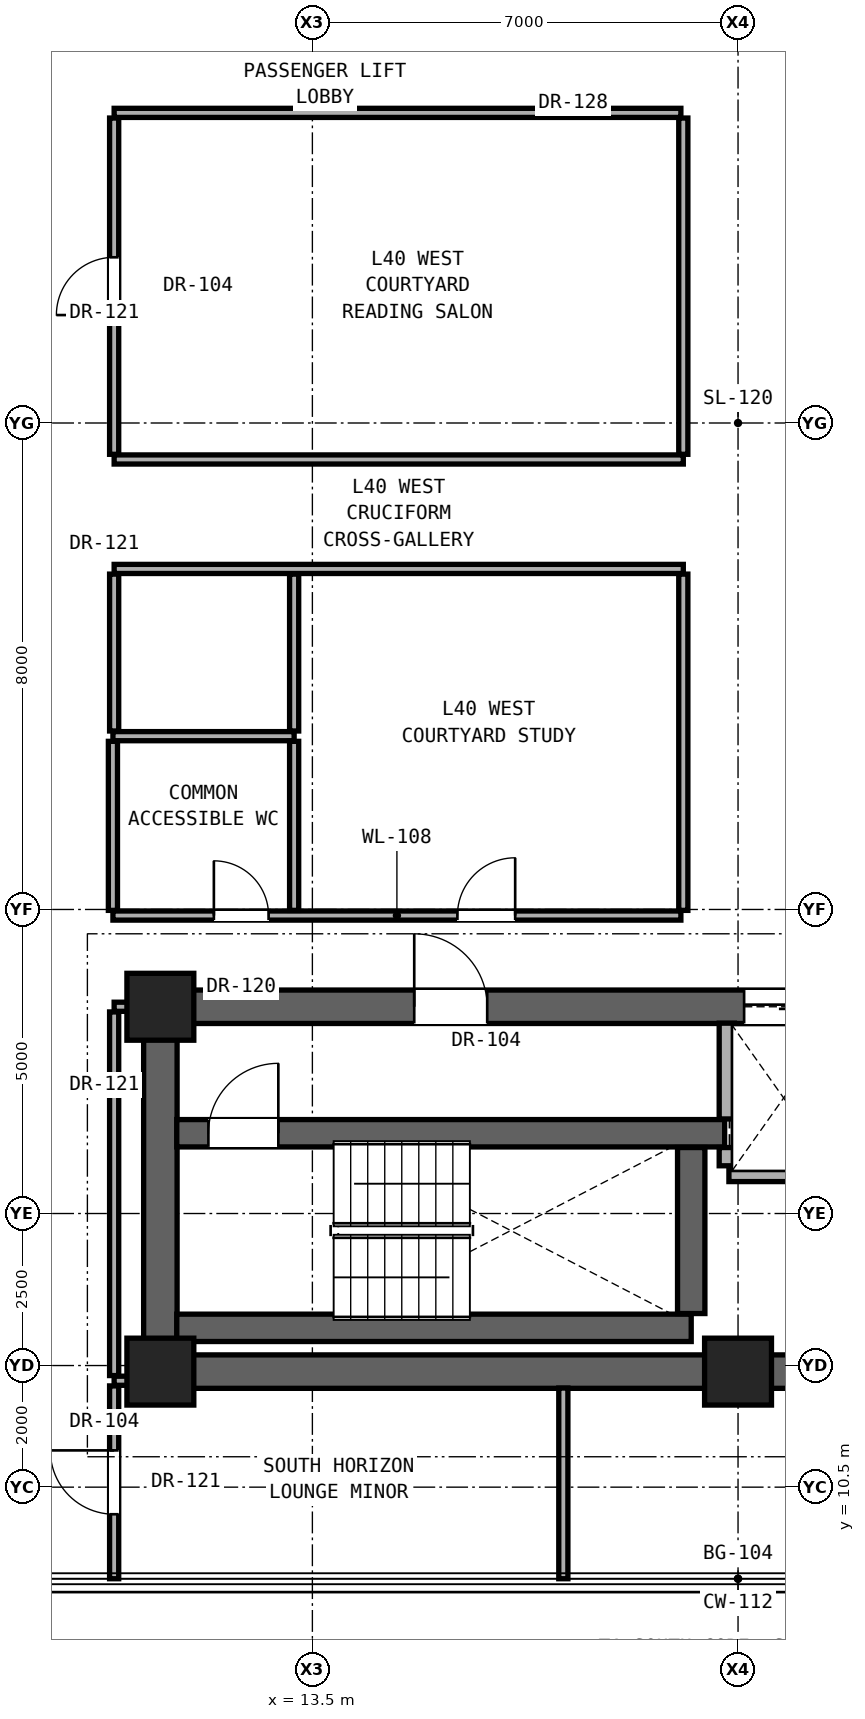
"""IFC4 building model, lengths in metres.
Left out: names, types, materials, properties, quantities, classifications, styles, units other than length and angle.
Written with IfcOpenShell. Run it as: python <this file> out.ifc"""

import sys

from ifc_helpers import new_model, si_unit, direction, frame, frame_2d, origin, origin_2d, place, context, subcontext, project, spatial, rectangle, extrude, element, fill, save


model = new_model("IFC4")
c1 = context("Model", 3, precision=1e-05, world=origin(), true_north=direction((0.0, 1.0)))
c2 = subcontext(c1, "Body", "Model", "MODEL_VIEW")
j1 = project(units=[si_unit("LENGTHUNIT", "METRE"), si_unit("PLANEANGLEUNIT", "RADIAN")], contexts=[c1])
p1 = place(None, origin())
s1 = spatial("IfcSite", under=j1, at=p1, CompositionType="ELEMENT")
p2 = place(p1, origin())
s2 = spatial("IfcBuilding", under=s1, at=p2, CompositionType="ELEMENT")
p3 = place(p2, frame((0.0, 0.0, 141.2)))
s3 = spatial("IfcBuildingStorey", under=s2, at=p3, CompositionType="ELEMENT", Elevation=141.2)
for number, where, z_axis, x_axis in (
    (1, (11.0, 12.4, 0.0), (0.0, 0.0, 1.0), (1.0, 0.0, 0.0)),
    (2, (20.5, 12.4, 0.0), (0.0, 0.0, 1.0), (1.0, 0.0, 0.0)),
    (3, (11.0, 18.4, 0.0), (0.0, 0.0, 1.0), (1.0, 0.0, 0.0)),
):
    element("IfcColumn", number, at=place(p3, frame(where, z_axis=z_axis, x_axis=x_axis)), inside=s3, PredefinedType="COLUMN", context=c2, shape_type="SweptSolid", body=[
        extrude(rectangle(XDim=1.1, YDim=1.1, at=origin_2d()), origin(), (0.0, 0.0, 1.0), 3.3),
    ])
p4 = place(p3, frame((11.0, 12.4, 0.0), z_axis=(0.0, 0.0, 1.0), x_axis=(1.0, 0.0, 0.0)))
e4 = element("IfcWall", 4, at=p4, inside=s3, PredefinedType="SHEAR", context=c2, shape_type="SweptSolid", body=[
    extrude(rectangle(XDim=19.0, YDim=0.55, at=frame_2d((9.5, 0.0))), origin(), (0.0, 0.0, 1.0), 3.08),
])
p5 = place(p3, frame((11.0, 12.4, 0.0), z_axis=(0.0, 0.0, 1.0), x_axis=(0.0, 1.0, 0.0)))
e5 = element("IfcWall", 5, at=p5, inside=s3, PredefinedType="SHEAR", context=c2, shape_type="SweptSolid", body=[
    extrude(rectangle(XDim=6.0, YDim=0.55, at=frame_2d((3.0, 0.0))), origin(), (0.0, 0.0, 1.0), 3.08),
])
p6 = place(p3, frame((11.0, 18.4, 0.0), z_axis=(0.0, 0.0, 1.0), x_axis=(1.0, 0.0, 0.0)))
e6 = element("IfcWall", 6, at=p6, inside=s3, PredefinedType="SHEAR", context=c2, shape_type="SweptSolid", body=[
    extrude(rectangle(XDim=19.0, YDim=0.55, at=frame_2d((9.5, 0.0))), origin(), (0.0, 0.0, 1.0), 3.08),
])
p7 = place(p6, frame((4.175, 0.0, 0.0)))
e7 = element("IfcOpeningElement", 7, at=p7, cuts=e6, PredefinedType="OPENING", context=c2, shape_type="SweptSolid", body=[
    extrude(rectangle(XDim=1.2, YDim=2.25, at=frame_2d((0.6, 1.125))), frame((0.0, 0.285, 0.0), z_axis=(0.0, -1.0, 0.0), x_axis=(1.0, 0.0, 0.0)), (0.0, 0.0, 1.0), 0.57),
])
p8 = place(p6, frame((9.6, 0.0, 0.0)))
e8 = element("IfcOpeningElement", 8, at=p8, cuts=e6, PredefinedType="OPENING", context=c2, shape_type="SweptSolid", body=[
    extrude(rectangle(XDim=1.3, YDim=2.3, at=frame_2d((0.65, 1.15))), frame((0.0, 0.285, 0.0), z_axis=(0.0, -1.0, 0.0), x_axis=(1.0, 0.0, 0.0)), (0.0, 0.0, 1.0), 0.57),
])
p9 = place(p6, frame((11.9, 0.0, 0.0)))
e9 = element("IfcOpeningElement", 9, at=p9, cuts=e6, PredefinedType="OPENING", context=c2, shape_type="SweptSolid", body=[
    extrude(rectangle(XDim=1.3, YDim=2.3, at=frame_2d((0.65, 1.15))), frame((0.0, 0.285, 0.0), z_axis=(0.0, -1.0, 0.0), x_axis=(1.0, 0.0, 0.0)), (0.0, 0.0, 1.0), 0.57),
])
p10 = place(p6, frame((14.3, 0.0, 0.0)))
e10 = element("IfcOpeningElement", 10, at=p10, cuts=e6, PredefinedType="OPENING", context=c2, shape_type="SweptSolid", body=[
    extrude(rectangle(XDim=1.3, YDim=2.3, at=frame_2d((0.65, 1.15))), frame((0.0, 0.285, 0.0), z_axis=(0.0, -1.0, 0.0), x_axis=(1.0, 0.0, 0.0)), (0.0, 0.0, 1.0), 0.57),
])
p11 = place(p6, frame((16.6, 0.0, 0.0)))
e11 = element("IfcOpeningElement", 11, at=p11, cuts=e6, PredefinedType="OPENING", context=c2, shape_type="SweptSolid", body=[
    extrude(rectangle(XDim=1.3, YDim=2.3, at=frame_2d((0.65, 1.15))), frame((0.0, 0.285, 0.0), z_axis=(0.0, -1.0, 0.0), x_axis=(1.0, 0.0, 0.0)), (0.0, 0.0, 1.0), 0.57),
])
p12 = place(p3, frame((10.24, 12.25, 0.0), z_axis=(0.0, 0.0, 1.0), x_axis=(1.0, 0.0, 0.0)))
e12 = element("IfcWall", 12, at=p12, inside=s3, PredefinedType="PARTITIONING", context=c2, shape_type="SweptSolid", body=[
    extrude(rectangle(XDim=0.49, YDim=0.15, at=frame_2d((0.245, 0.0))), origin(), (0.0, 0.0, 1.0), 3.08),
])
p13 = place(p3, frame((11.27, 13.12, 0.0), z_axis=(0.0, 0.0, 1.0), x_axis=(1.0, 0.0, 0.0)))
e13 = element("IfcWall", 13, at=p13, inside=s3, PredefinedType="SHEAR", context=c2, shape_type="SweptSolid", body=[
    extrude(rectangle(XDim=8.46, YDim=0.45, at=frame_2d((4.23, 0.0))), origin(), (0.0, 0.0, 1.0), 3.08),
])
p14 = place(p3, frame((20.35, 15.65, 0.0), z_axis=(0.0, 0.0, 1.0), x_axis=(1.0, 0.0, 0.0)))
e14 = element("IfcWall", 14, at=p14, inside=s3, PredefinedType="SOLIDWALL", context=c2, shape_type="SweptSolid", body=[
    extrude(rectangle(XDim=4.15, YDim=0.25, at=frame_2d((2.075, 0.0))), origin(), (0.0, 0.0, 1.0), 3.08),
])
p15 = place(p3, frame((11.27, 16.32, 0.0), z_axis=(0.0, 0.0, 1.0), x_axis=(1.0, 0.0, 0.0)))
e15 = element("IfcWall", 15, at=p15, inside=s3, PredefinedType="SHEAR", context=c2, shape_type="SweptSolid", body=[
    extrude(rectangle(XDim=9.01, YDim=0.45, at=frame_2d((4.505, 0.0))), origin(), (0.0, 0.0, 1.0), 3.08),
])
p16 = place(p15, frame((0.52, 0.0, 0.0)))
e16 = element("IfcOpeningElement", 16, at=p16, cuts=e15, PredefinedType="OPENING", context=c2, shape_type="SweptSolid", body=[
    extrude(rectangle(XDim=1.15, YDim=2.2, at=frame_2d((0.575, 1.1))), frame((0.0, 0.235, 0.0), z_axis=(0.0, -1.0, 0.0), x_axis=(1.0, 0.0, 0.0)), (0.0, 0.0, 1.0), 0.47),
])
p17 = place(p3, frame((10.24, 18.4, 0.0), z_axis=(0.0, 0.0, 1.0), x_axis=(1.0, 0.0, 0.0)))
e17 = element("IfcWall", 17, at=p17, inside=s3, PredefinedType="PARTITIONING", context=c2, shape_type="SweptSolid", body=[
    extrude(rectangle(XDim=0.49, YDim=0.15, at=frame_2d((0.245, 0.0))), origin(), (0.0, 0.0, 1.0), 2.456),
])
p18 = place(p3, frame((10.22, 19.9, 0.0), z_axis=(0.0, 0.0, 1.0), x_axis=(1.0, 0.0, 0.0)))
e18 = element("IfcWall", 18, at=p18, inside=s3, PredefinedType="PARTITIONING", context=c2, shape_type="SweptSolid", body=[
    extrude(rectangle(XDim=9.34, YDim=0.15, at=frame_2d((4.67, 0.0))), origin(), (0.0, 0.0, 1.0), 2.216),
])
p19 = place(p18, frame((1.66, 0.0, 0.0)))
e19 = element("IfcOpeningElement", 19, at=p19, cuts=e18, PredefinedType="OPENING", context=c2, shape_type="SweptSolid", body=[
    extrude(rectangle(XDim=0.9, YDim=2.1, at=frame_2d((0.45, 1.05))), frame((0.0, 0.085, 0.0), z_axis=(0.0, -1.0, 0.0), x_axis=(1.0, 0.0, 0.0)), (0.0, 0.0, 1.0), 0.17),
])
p20 = place(p18, frame((5.665, 0.0, 0.0)))
e20 = element("IfcOpeningElement", 20, at=p20, cuts=e18, PredefinedType="OPENING", context=c2, shape_type="SweptSolid", body=[
    extrude(rectangle(XDim=0.95, YDim=2.15, at=frame_2d((0.475, 1.075))), frame((0.0, 0.085, 0.0), z_axis=(0.0, -1.0, 0.0), x_axis=(1.0, 0.0, 0.0)), (0.0, 0.0, 1.0), 0.17),
])
p21 = place(p3, frame((10.22, 22.85, 0.0), z_axis=(0.0, 0.0, 1.0), x_axis=(1.0, 0.0, 0.0)))
e21 = element("IfcWall", 21, at=p21, inside=s3, PredefinedType="PARTITIONING", context=c2, shape_type="SweptSolid", body=[
    extrude(rectangle(XDim=2.98, YDim=0.15, at=frame_2d((1.49, 0.0))), origin(), (0.0, 0.0, 1.0), 2.216),
])
for number, where, z_axis, x_axis in (
    (22, (10.24, 25.6, 0.0), (0.0, 0.0, 1.0), (1.0, 0.0, 0.0)),
    (23, (10.24, 27.4, 0.0), (0.0, 0.0, 1.0), (1.0, 0.0, 0.0)),
):
    element("IfcWall", number, at=place(p3, frame(where, z_axis=z_axis, x_axis=x_axis)), inside=s3, PredefinedType="PARTITIONING", context=c2, shape_type="SweptSolid", body=[
        extrude(rectangle(XDim=9.36, YDim=0.15, at=frame_2d((4.68, 0.0))), origin(), (0.0, 0.0, 1.0), 2.216),
    ])
p22 = place(p3, frame((10.24, 33.1, 0.0), z_axis=(0.0, 0.0, 1.0), x_axis=(1.0, 0.0, 0.0)))
e24 = element("IfcWall", 24, at=p22, inside=s3, PredefinedType="PARTITIONING", context=c2, shape_type="SweptSolid", body=[
    extrude(rectangle(XDim=9.32, YDim=0.15, at=frame_2d((4.66, 0.0))), origin(), (0.0, 0.0, 1.0), 2.216),
])
p23 = place(p3, frame((10.22, 19.985, 0.0), z_axis=(0.0, 0.0, 1.0), x_axis=(0.0, 1.0, 0.0)))
e25 = element("IfcWall", 25, at=p23, inside=s3, PredefinedType="PARTITIONING", context=c2, shape_type="SweptSolid", body=[
    extrude(rectangle(XDim=2.78, YDim=0.15, at=frame_2d((1.39, 0.0))), origin(), (0.0, 0.0, 1.0), 3.08),
])
p24 = place(p3, frame((10.24, 8.994, 0.0), z_axis=(0.0, 0.0, 1.0), x_axis=(0.0, 1.0, 0.0)))
e26 = element("IfcWall", 26, at=p24, inside=s3, PredefinedType="PARTITIONING", context=c2, shape_type="SweptSolid", body=[
    extrude(rectangle(XDim=3.171, YDim=0.15, at=frame_2d((1.585, 0.0))), origin(), (0.0, 0.0, 1.0), 3.08),
])
p25 = place(p24, frame((1.061, 0.0, 0.0)))
e27 = element("IfcOpeningElement", 27, at=p25, cuts=e26, PredefinedType="OPENING", context=c2, shape_type="SweptSolid", body=[
    extrude(rectangle(XDim=1.05, YDim=2.2, at=frame_2d((0.525, 1.1))), frame((0.0, 0.085, 0.0), z_axis=(0.0, -1.0, 0.0), x_axis=(1.0, 0.0, 0.0)), (0.0, 0.0, 1.0), 0.17),
])
p26 = place(p3, frame((10.24, 12.335, 0.0), z_axis=(0.0, 0.0, 1.0), x_axis=(0.0, 1.0, 0.0)))
e28 = element("IfcWall", 28, at=p26, inside=s3, PredefinedType="PARTITIONING", context=c2, shape_type="SweptSolid", body=[
    extrude(rectangle(XDim=5.98, YDim=0.15, at=frame_2d((2.99, 0.0))), origin(), (0.0, 0.0, 1.0), 2.456),
])
p27 = place(p3, frame((10.24, 22.935, 0.0), z_axis=(0.0, 0.0, 1.0), x_axis=(0.0, 1.0, 0.0)))
e29 = element("IfcWall", 29, at=p27, inside=s3, PredefinedType="PARTITIONING", context=c2, shape_type="SweptSolid", body=[
    extrude(rectangle(XDim=2.58, YDim=0.15, at=frame_2d((1.29, 0.0))), origin(), (0.0, 0.0, 1.0), 2.299),
])
p28 = place(p3, frame((10.24, 27.485, 0.0), z_axis=(0.0, 0.0, 1.0), x_axis=(0.0, 1.0, 0.0)))
e30 = element("IfcWall", 30, at=p28, inside=s3, PredefinedType="PARTITIONING", context=c2, shape_type="SweptSolid", body=[
    extrude(rectangle(XDim=5.53, YDim=0.15, at=frame_2d((2.765, 0.0))), origin(), (0.0, 0.0, 1.0), 2.299),
])
p29 = place(p28, frame((2.29, 0.0, 0.0)))
e31 = element("IfcOpeningElement", 31, at=p29, cuts=e30, PredefinedType="OPENING", context=c2, shape_type="SweptSolid", body=[
    extrude(rectangle(XDim=0.95, YDim=2.15, at=frame_2d((0.475, 1.075))), frame((0.0, 0.085, 0.0), z_axis=(0.0, -1.0, 0.0), x_axis=(1.0, 0.0, 0.0)), (0.0, 0.0, 1.0), 0.17),
])
p30 = place(p3, frame((13.2, 19.985, 0.0), z_axis=(0.0, 0.0, 1.0), x_axis=(0.0, 1.0, 0.0)))
e32 = element("IfcWall", 32, at=p30, inside=s3, PredefinedType="PARTITIONING", context=c2, shape_type="SweptSolid", body=[
    extrude(rectangle(XDim=2.78, YDim=0.15, at=frame_2d((1.39, 0.0))), origin(), (0.0, 0.0, 1.0), 3.08),
])
p31 = place(p3, frame((13.2, 22.935, 0.0), z_axis=(0.0, 0.0, 1.0), x_axis=(0.0, 1.0, 0.0)))
e33 = element("IfcWall", 33, at=p31, inside=s3, PredefinedType="PARTITIONING", context=c2, shape_type="SweptSolid", body=[
    extrude(rectangle(XDim=2.58, YDim=0.15, at=frame_2d((1.29, 0.0))), origin(), (0.0, 0.0, 1.0), 2.216),
])
p32 = place(p3, frame((17.627, 8.994, 0.0), z_axis=(0.0, 0.0, 1.0), x_axis=(0.0, 1.0, 0.0)))
e34 = element("IfcWall", 34, at=p32, inside=s3, PredefinedType="PARTITIONING", context=c2, shape_type="SweptSolid", body=[
    extrude(rectangle(XDim=3.136, YDim=0.15, at=frame_2d((1.568, 0.0))), origin(), (0.0, 0.0, 1.0), 3.08),
])
for number, where, z_axis, x_axis in (
    (35, (19.6, 19.985, 0.0), (0.0, 0.0, 1.0), (0.0, 1.0, 0.0)),
    (36, (19.6, 27.485, 0.0), (0.0, 0.0, 1.0), (0.0, 1.0, 0.0)),
):
    element("IfcWall", number, at=place(p3, frame(where, z_axis=z_axis, x_axis=x_axis)), inside=s3, PredefinedType="PARTITIONING", context=c2, shape_type="SweptSolid", body=[
        extrude(rectangle(XDim=5.53, YDim=0.15, at=frame_2d((2.765, 0.0))), origin(), (0.0, 0.0, 1.0), 2.216),
    ])
p33 = place(p3, frame((19.73, 13.355, 0.0), z_axis=(0.0, 0.0, 1.0), x_axis=(0.0, 1.0, 0.0)))
e37 = element("IfcWall", 37, at=p33, inside=s3, PredefinedType="SHEAR", context=c2, shape_type="SweptSolid", body=[
    extrude(rectangle(XDim=2.73, YDim=0.45, at=frame_2d((1.365, 0.0))), origin(), (0.0, 0.0, 1.0), 3.08),
])
p34 = place(p3, frame((20.315, 15.785, 0.0), z_axis=(0.0, 0.0, 1.0), x_axis=(0.0, 1.0, 0.0)))
e38 = element("IfcWall", 38, at=p34, inside=s3, PredefinedType="SOLIDWALL", context=c2, shape_type="SweptSolid", body=[
    extrude(rectangle(XDim=0.3, YDim=0.25, at=frame_2d((0.15, 0.0))), origin(), (0.0, 0.0, 1.0), 3.08),
])
p35 = place(p3, frame((20.315, 16.555, 0.0), z_axis=(0.0, 0.0, 1.0), x_axis=(0.0, 1.0, 0.0)))
e39 = element("IfcWall", 39, at=p35, inside=s3, PredefinedType="SOLIDWALL", context=c2, shape_type="SweptSolid", body=[
    extrude(rectangle(XDim=1.575, YDim=0.25, at=frame_2d((0.788, 0.0))), origin(), (0.0, 0.0, 1.0), 3.08),
])
p36 = place(p7, origin())
e40 = element("IfcDoor", 40, at=p36, inside=s3, OperationType="SINGLE_SWING_LEFT", PredefinedType="DOOR", context=c2, shape_type="SweptSolid", body=[
    extrude(rectangle(XDim=1.2, YDim=2.25, at=frame_2d((0.6, 1.125))), frame((0.0, 0.025, 0.0), z_axis=(0.0, -1.0, 0.0), x_axis=(1.0, 0.0, 0.0)), (0.0, 0.0, 1.0), 0.05),
])
fill(e7, e40)
p37 = place(p16, origin())
e41 = element("IfcDoor", 41, at=p37, inside=s3, OperationType="SINGLE_SWING_RIGHT", PredefinedType="DOOR", context=c2, shape_type="SweptSolid", body=[
    extrude(rectangle(XDim=1.15, YDim=2.2, at=frame_2d((0.575, 1.1))), frame((0.0, 0.025, 0.0), z_axis=(0.0, -1.0, 0.0), x_axis=(1.0, 0.0, 0.0)), (0.0, 0.0, 1.0), 0.05),
])
fill(e16, e41)
p38 = place(p19, origin())
e42 = element("IfcDoor", 42, at=p38, inside=s3, OperationType="SINGLE_SWING_LEFT", PredefinedType="DOOR", context=c2, shape_type="SweptSolid", body=[
    extrude(rectangle(XDim=0.9, YDim=2.1, at=frame_2d((0.45, 1.05))), frame((0.0, 0.025, 0.0), z_axis=(0.0, -1.0, 0.0), x_axis=(1.0, 0.0, 0.0)), (0.0, 0.0, 1.0), 0.05),
])
fill(e19, e42)
p39 = place(p20, origin())
e43 = element("IfcDoor", 43, at=p39, inside=s3, OperationType="SINGLE_SWING_RIGHT", PredefinedType="DOOR", context=c2, shape_type="SweptSolid", body=[
    extrude(rectangle(XDim=0.95, YDim=2.15, at=frame_2d((0.475, 1.075))), frame((0.0, 0.025, 0.0), z_axis=(0.0, -1.0, 0.0), x_axis=(1.0, 0.0, 0.0)), (0.0, 0.0, 1.0), 0.05),
])
fill(e20, e43)
p40 = place(p29, origin())
e44 = element("IfcDoor", 44, at=p40, inside=s3, OperationType="SINGLE_SWING_LEFT", PredefinedType="DOOR", context=c2, shape_type="SweptSolid", body=[
    extrude(rectangle(XDim=0.95, YDim=2.15, at=frame_2d((0.475, 1.075))), frame((0.0, 0.025, 0.0), z_axis=(0.0, -1.0, 0.0), x_axis=(1.0, 0.0, 0.0)), (0.0, 0.0, 1.0), 0.05),
])
fill(e31, e44)
p41 = place(p25, origin())
e45 = element("IfcDoor", 45, at=p41, inside=s3, OperationType="SINGLE_SWING_RIGHT", PredefinedType="DOOR", context=c2, shape_type="SweptSolid", body=[
    extrude(rectangle(XDim=1.05, YDim=2.2, at=frame_2d((0.525, 1.1))), frame((0.0, 0.025, 0.0), z_axis=(0.0, -1.0, 0.0), x_axis=(1.0, 0.0, 0.0)), (0.0, 0.0, 1.0), 0.05),
])
fill(e27, e45)
p42 = place(p8, origin())
e46 = element("IfcDoor", 46, at=p42, inside=s3, OperationType="DOUBLE_DOOR_SLIDING", PredefinedType="DOOR", context=c2, shape_type="SweptSolid", body=[
    extrude(rectangle(XDim=1.3, YDim=2.3, at=frame_2d((0.65, 1.15))), frame((0.0, 0.025, 0.0), z_axis=(0.0, -1.0, 0.0), x_axis=(1.0, 0.0, 0.0)), (0.0, 0.0, 1.0), 0.05),
])
fill(e8, e46)
save(model, sys.argv[1])
